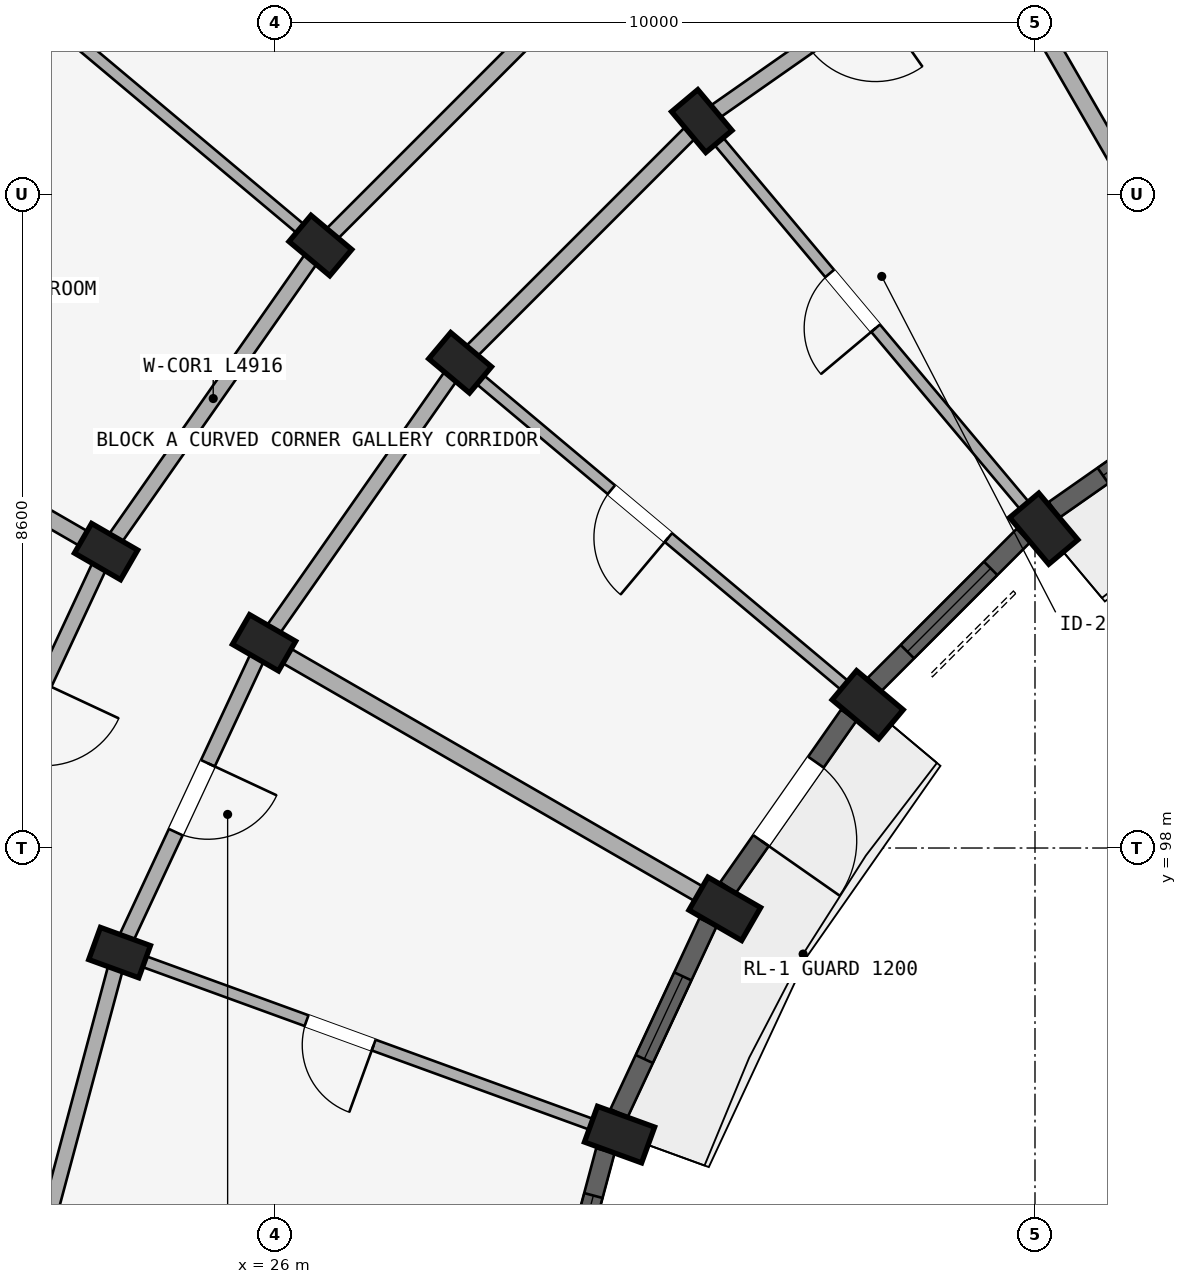
"""IFC4 building model, lengths in metres.
Left out: names, types, materials, properties, quantities, classifications, styles, units other than length and angle.
Written with IfcOpenShell. Run it as: python <this file> out.ifc"""

import sys

from ifc_helpers import new_model, si_unit, direction, frame, frame_2d, origin, origin_2d, place, context, subcontext, project, spatial, rectangle, extrude, element, fill, save


model = new_model("IFC4")
c1 = context("Model", 3, precision=1e-05, world=origin(), true_north=direction((0.0, 1.0)))
c2 = subcontext(c1, "Body", "Model", "MODEL_VIEW")
j1 = project(units=[si_unit("LENGTHUNIT", "METRE"), si_unit("PLANEANGLEUNIT", "RADIAN")], contexts=[c1])
p1 = place(None, origin())
s1 = spatial("IfcSite", under=j1, at=p1, CompositionType="ELEMENT")
p2 = place(p1, origin())
s2 = spatial("IfcBuilding", under=s1, at=p2, CompositionType="ELEMENT")
p3 = place(p2, frame((0.0, 0.0, 18.15)))
s3 = spatial("IfcBuildingStorey", under=s2, at=p3, CompositionType="ELEMENT", Elevation=18.15)
p4 = place(p3, frame((36.115, 102.202, 0.0), z_axis=(0.0, 0.0, 1.0), x_axis=(0.766044443119, 0.642787609687, 0.0)))
e1 = element("IfcColumn", 1, at=p4, inside=s3, PredefinedType="COLUMN", context=c2, shape_type="SweptSolid", body=[
    extrude(rectangle(XDim=0.5, YDim=0.8, at=origin_2d()), origin(), (0.0, 0.0, 1.0), 2.93),
])
p5 = place(p3, frame((31.616, 107.564, 0.0), z_axis=(0.0, 0.0, 1.0), x_axis=(0.766044443119, 0.642787609687, 0.0)))
e2 = element("IfcColumn", 2, at=p5, inside=s3, PredefinedType="COLUMN", context=c2, shape_type="SweptSolid", body=[
    extrude(rectangle(XDim=0.45, YDim=0.7, at=origin_2d()), origin(), (0.0, 0.0, 1.0), 2.93),
])
p6 = place(p3, frame((33.798, 99.885, 0.0), z_axis=(0.0, 0.0, 1.0), x_axis=(0.642787609687, 0.766044443119, 0.0)))
e3 = element("IfcColumn", 3, at=p6, inside=s3, PredefinedType="COLUMN", context=c2, shape_type="SweptSolid", body=[
    extrude(rectangle(XDim=0.5, YDim=0.8, at=origin_2d()), origin(), (0.0, 0.0, 1.0), 2.93),
])
for number, where, z_axis, x_axis in (
    (4, (28.436, 104.384, 0.0), (0.0, 0.0, 1.0), (0.643, 0.766, 0.0)),
    (5, (26.598, 105.927, 0.0), (0.0, 0.0, 1.0), (0.643, 0.766, 0.0)),
):
    element("IfcColumn", number, at=place(p3, frame(where, z_axis=z_axis, x_axis=x_axis)), inside=s3, PredefinedType="COLUMN", context=c2, shape_type="SweptSolid", body=[
        extrude(rectangle(XDim=0.45, YDim=0.7, at=origin_2d()), origin(), (0.0, 0.0, 1.0), 2.93),
    ])
p7 = place(p3, frame((31.919, 97.2, 0.0), z_axis=(0.0, 0.0, 1.0), x_axis=(0.5, 0.866025403784, 0.0)))
e6 = element("IfcColumn", 6, at=p7, inside=s3, PredefinedType="COLUMN", context=c2, shape_type="SweptSolid", body=[
    extrude(rectangle(XDim=0.5, YDim=0.8, at=origin_2d()), origin(), (0.0, 0.0, 1.0), 2.93),
])
for number, where, z_axis, x_axis in (
    (7, (25.856, 100.7, 0.0), (0.0, 0.0, 1.0), (0.5, 0.866, 0.0)),
    (8, (23.778, 101.9, 0.0), (0.0, 0.0, 1.0), (0.5, 0.866, 0.0)),
):
    element("IfcColumn", number, at=place(p3, frame(where, z_axis=z_axis, x_axis=x_axis)), inside=s3, PredefinedType="COLUMN", context=c2, shape_type="SweptSolid", body=[
        extrude(rectangle(XDim=0.45, YDim=0.7, at=origin_2d()), origin(), (0.0, 0.0, 1.0), 2.93),
    ])
p8 = place(p3, frame((30.534, 94.23, 0.0), z_axis=(0.0, 0.0, 1.0), x_axis=(0.342020143326, 0.939692620786, 0.0)))
e9 = element("IfcColumn", 9, at=p8, inside=s3, PredefinedType="COLUMN", context=c2, shape_type="SweptSolid", body=[
    extrude(rectangle(XDim=0.5, YDim=0.8, at=origin_2d()), origin(), (0.0, 0.0, 1.0), 2.93),
])
p9 = place(p3, frame((23.956, 96.624, 0.0), z_axis=(0.0, 0.0, 1.0), x_axis=(0.342020143326, 0.939692620786, 0.0)))
e10 = element("IfcColumn", 10, at=p9, inside=s3, PredefinedType="COLUMN", context=c2, shape_type="SweptSolid", body=[
    extrude(rectangle(XDim=0.45, YDim=0.7, at=origin_2d()), origin(), (0.0, 0.0, 1.0), 2.93),
])
p10 = place(p3, frame((35.3, 110.144, 0.0), z_axis=(0.0, 0.0, 1.0), x_axis=(-0.819155404658, -0.573571637217, 0.0)))
e11 = element("IfcWall", 11, at=p10, inside=s3, PredefinedType="STANDARD", context=c2, shape_type="SweptSolid", body=[
    extrude(rectangle(XDim=4.497, YDim=0.2, at=frame_2d((2.249, 0.0))), origin(), (0.0, 0.0, 1.0), 2.372),
])
p11 = place(p10, frame((1.709, 0.0, 0.0)))
e12 = element("IfcOpeningElement", 12, at=p11, cuts=e11, PredefinedType="OPENING", context=c2, shape_type="SweptSolid", body=[
    extrude(rectangle(XDim=1.08, YDim=2.15, at=frame_2d((0.54, 1.075))), frame((0.0, 0.11, 0.0), z_axis=(0.0, -1.0, 0.0), x_axis=(1.0, 0.0, 0.0)), (0.0, 0.0, 1.0), 0.22),
])
p12 = place(p3, frame((31.616, 107.564, 0.0), z_axis=(0.0, 0.0, 1.0), x_axis=(-0.707106781187, -0.707106781187, 0.0)))
e13 = element("IfcWall", 13, at=p12, inside=s3, PredefinedType="STANDARD", context=c2, shape_type="SweptSolid", body=[
    extrude(rectangle(XDim=4.497, YDim=0.2, at=frame_2d((2.249, 0.0))), origin(), (0.0, 0.0, 1.0), 2.372),
])
p13 = place(p3, frame((30.073, 109.402, 0.0), z_axis=(0.0, 0.0, 1.0), x_axis=(-0.707106781187, -0.707106781187, 0.0)))
e14 = element("IfcWall", 14, at=p13, inside=s3, PredefinedType="STANDARD", context=c2, shape_type="SweptSolid", body=[
    extrude(rectangle(XDim=4.916, YDim=0.2, at=frame_2d((2.458, 0.0))), origin(), (0.0, 0.0, 1.0), 2.372),
])
p14 = place(p3, frame((28.436, 104.384, 0.0), z_axis=(0.0, 0.0, 1.0), x_axis=(-0.573571637217, -0.819155404658, 0.0)))
e15 = element("IfcWall", 15, at=p14, inside=s3, PredefinedType="STANDARD", context=c2, shape_type="SweptSolid", body=[
    extrude(rectangle(XDim=4.497, YDim=0.2, at=frame_2d((2.249, 0.0))), origin(), (0.0, 0.0, 1.0), 2.372),
])
p15 = place(p3, frame((26.598, 105.927, 0.0), z_axis=(0.0, 0.0, 1.0), x_axis=(-0.573592335331, -0.819140911474, 0.0)))
e16 = element("IfcWall", 16, at=p15, inside=s3, PredefinedType="STANDARD", context=c2, shape_type="SweptSolid", body=[
    extrude(rectangle(XDim=4.916, YDim=0.2, at=frame_2d((2.458, 0.0))), origin(), (0.0, 0.0, 1.0), 2.372),
])
p16 = place(p3, frame((25.856, 100.7, 0.0), z_axis=(0.0, 0.0, 1.0), x_axis=(-0.422617978463, -0.906307919131, 0.0)))
e17 = element("IfcWall", 17, at=p16, inside=s3, PredefinedType="STANDARD", context=c2, shape_type="SweptSolid", body=[
    extrude(rectangle(XDim=4.497, YDim=0.2, at=frame_2d((2.249, 0.0))), origin(), (0.0, 0.0, 1.0), 2.372),
])
p17 = place(p16, frame((1.749, 0.0, 0.0)))
e18 = element("IfcOpeningElement", 18, at=p17, cuts=e17, PredefinedType="OPENING", context=c2, shape_type="SweptSolid", body=[
    extrude(rectangle(XDim=1.0, YDim=2.15, at=frame_2d((0.5, 1.075))), frame((0.0, 0.11, 0.0), z_axis=(0.0, -1.0, 0.0), x_axis=(1.0, 0.0, 0.0)), (0.0, 0.0, 1.0), 0.22),
])
p18 = place(p3, frame((23.778, 101.9, 0.0), z_axis=(0.0, 0.0, 1.0), x_axis=(-0.422629854778, -0.906302381024, 0.0)))
e19 = element("IfcWall", 19, at=p18, inside=s3, PredefinedType="STANDARD", context=c2, shape_type="SweptSolid", body=[
    extrude(rectangle(XDim=4.915, YDim=0.2, at=frame_2d((2.458, 0.0))), origin(), (0.0, 0.0, 1.0), 2.372),
])
p19 = place(p18, frame((1.918, 0.0, 0.0)))
e20 = element("IfcOpeningElement", 20, at=p19, cuts=e19, PredefinedType="OPENING", context=c2, shape_type="SweptSolid", body=[
    extrude(rectangle(XDim=1.08, YDim=2.15, at=frame_2d((0.54, 1.075))), frame((0.0, 0.11, 0.0), z_axis=(0.0, -1.0, 0.0), x_axis=(1.0, 0.0, 0.0)), (0.0, 0.0, 1.0), 0.22),
])
p20 = place(p3, frame((23.956, 96.624, 0.0), z_axis=(0.0, 0.0, 1.0), x_axis=(-0.258787642463, -0.965934240054, 0.0)))
e21 = element("IfcWall", 21, at=p20, inside=s3, PredefinedType="STANDARD", context=c2, shape_type="SweptSolid", body=[
    extrude(rectangle(XDim=4.497, YDim=0.2, at=frame_2d((2.249, 0.0))), origin(), (0.0, 0.0, 1.0), 2.372),
])
p21 = place(p3, frame((38.7, 104.254, 0.0), z_axis=(0.0, 0.0, 1.0), x_axis=(-0.499997969693, 0.866026575979, 0.0)))
e22 = element("IfcWall", 22, at=p21, inside=s3, PredefinedType="STANDARD", context=c2, shape_type="SweptSolid", body=[
    extrude(rectangle(XDim=6.75, YDim=0.22, at=frame_2d((3.375, 0.0))), origin(), (0.0, 0.0, 1.0), 2.372),
])
p22 = place(p3, frame((35.987, 102.355, 0.0), z_axis=(0.0, 0.0, 1.0), x_axis=(-0.642784846501, 0.766046761698, 0.0)))
e23 = element("IfcWall", 23, at=p22, inside=s3, PredefinedType="PARTITIONING", context=c2, shape_type="SweptSolid", body=[
    extrude(rectangle(XDim=6.75, YDim=0.15, at=frame_2d((3.375, 0.0))), origin(), (0.0, 0.0, 1.0), 2.372),
])
p23 = place(p22, frame((3.242, 0.0, 0.0)))
e24 = element("IfcOpeningElement", 24, at=p23, cuts=e23, PredefinedType="OPENING", context=c2, shape_type="SweptSolid", body=[
    extrude(rectangle(XDim=0.94, YDim=2.1, at=frame_2d((0.47, 1.05))), frame((0.0, 0.085, 0.0), z_axis=(0.0, -1.0, 0.0), x_axis=(1.0, 0.0, 0.0)), (0.0, 0.0, 1.0), 0.17),
])
p24 = place(p3, frame((33.645, 100.013, 0.0), z_axis=(0.0, 0.0, 1.0), x_axis=(-0.766046761698, 0.642784846501, 0.0)))
e25 = element("IfcWall", 25, at=p24, inside=s3, PredefinedType="PARTITIONING", context=c2, shape_type="SweptSolid", body=[
    extrude(rectangle(XDim=6.75, YDim=0.15, at=frame_2d((3.375, 0.0))), origin(), (0.0, 0.0, 1.0), 2.372),
])
p25 = place(p24, frame((3.222, 0.0, 0.0)))
e26 = element("IfcOpeningElement", 26, at=p25, cuts=e25, PredefinedType="OPENING", context=c2, shape_type="SweptSolid", body=[
    extrude(rectangle(XDim=0.98, YDim=2.12, at=frame_2d((0.49, 1.06))), frame((0.0, 0.085, 0.0), z_axis=(0.0, -1.0, 0.0), x_axis=(1.0, 0.0, 0.0)), (0.0, 0.0, 1.0), 0.17),
])
p26 = place(p3, frame((26.521, 105.991, 0.0), z_axis=(0.0, 0.0, 1.0), x_axis=(-0.766046835987, 0.642784757967, 0.0)))
e27 = element("IfcWall", 27, at=p26, inside=s3, PredefinedType="PARTITIONING", context=c2, shape_type="SweptSolid", body=[
    extrude(rectangle(XDim=17.42, YDim=0.15, at=frame_2d((8.71, 0.0))), origin(), (0.0, 0.0, 1.0), 2.372),
])
p27 = place(p26, frame((4.45, 0.0, 0.0)))
e28 = element("IfcOpeningElement", 28, at=p27, cuts=e27, PredefinedType="OPENING", context=c2, shape_type="SweptSolid", body=[
    extrude(rectangle(XDim=0.8, YDim=2.1, at=frame_2d((0.4, 1.05))), frame((0.0, 0.085, 0.0), z_axis=(0.0, -1.0, 0.0), x_axis=(1.0, 0.0, 0.0)), (0.0, 0.0, 1.0), 0.17),
])
p28 = place(p3, frame((31.746, 97.3, 0.0), z_axis=(0.0, 0.0, 1.0), x_axis=(-0.866026575979, 0.499997969693, 0.0)))
e29 = element("IfcWall", 29, at=p28, inside=s3, PredefinedType="STANDARD", context=c2, shape_type="SweptSolid", body=[
    extrude(rectangle(XDim=6.75, YDim=0.22, at=frame_2d((3.375, 0.0))), origin(), (0.0, 0.0, 1.0), 2.372),
])
p29 = place(p3, frame((23.691, 101.95, 0.0), z_axis=(0.0, 0.0, 1.0), x_axis=(-0.866026648973, 0.499997843263, 0.0)))
e30 = element("IfcWall", 30, at=p29, inside=s3, PredefinedType="STANDARD", context=c2, shape_type="SweptSolid", body=[
    extrude(rectangle(XDim=17.42, YDim=0.22, at=frame_2d((8.71, 0.0))), origin(), (0.0, 0.0, 1.0), 2.372),
])
p30 = place(p3, frame((30.346, 94.298, 0.0), z_axis=(0.0, 0.0, 1.0), x_axis=(-0.939696231917, 0.342010221662, 0.0)))
e31 = element("IfcWall", 31, at=p30, inside=s3, PredefinedType="PARTITIONING", context=c2, shape_type="SweptSolid", body=[
    extrude(rectangle(XDim=6.75, YDim=0.15, at=frame_2d((3.375, 0.0))), origin(), (0.0, 0.0, 1.0), 2.372),
])
p31 = place(p30, frame((3.242, 0.0, 0.0)))
e32 = element("IfcOpeningElement", 32, at=p31, cuts=e31, PredefinedType="OPENING", context=c2, shape_type="SweptSolid", body=[
    extrude(rectangle(XDim=0.94, YDim=2.1, at=frame_2d((0.47, 1.05))), frame((0.0, 0.085, 0.0), z_axis=(0.0, -1.0, 0.0), x_axis=(1.0, 0.0, 0.0)), (0.0, 0.0, 1.0), 0.17),
])
p32 = place(p3, frame((38.521, 104.038, 0.0), z_axis=(0.0, 0.0, 1.0), x_axis=(-0.819111815273, -0.573633885053, 0.0)))
e33 = element("IfcWall", 33, at=p32, inside=s3, PredefinedType="STANDARD", context=c2, shape_type="SweptSolid", body=[
    extrude(rectangle(XDim=2.77, YDim=0.25, at=frame_2d((1.385, 0.0))), origin(), (0.0, 0.0, 1.0), 2.422),
])
p33 = place(p32, frame((0.785, 0.0, 0.722)))
e34 = element("IfcOpeningElement", 34, at=p33, cuts=e33, PredefinedType="OPENING", context=c2, shape_type="SweptSolid", body=[
    extrude(rectangle(XDim=1.2, YDim=1.5, at=frame_2d((0.6, 0.75))), frame((0.0, 0.135, 0.0), z_axis=(0.0, -1.0, 0.0), x_axis=(1.0, 0.0, 0.0)), (0.0, 0.0, 1.0), 0.27),
])
p34 = place(p3, frame((35.848, 102.111, 0.0), z_axis=(0.0, 0.0, 1.0), x_axis=(-0.707106781187, -0.707106781187, 0.0)))
e35 = element("IfcWall", 35, at=p34, inside=s3, PredefinedType="STANDARD", context=c2, shape_type="SweptSolid", body=[
    extrude(rectangle(XDim=2.77, YDim=0.25, at=frame_2d((1.385, 0.0))), origin(), (0.0, 0.0, 1.0), 2.422),
])
p35 = place(p34, frame((0.61, 0.0, 0.622)))
e36 = element("IfcOpeningElement", 36, at=p35, cuts=e35, PredefinedType="OPENING", context=c2, shape_type="SweptSolid", body=[
    extrude(rectangle(XDim=1.55, YDim=1.6, at=frame_2d((0.775, 0.8))), frame((0.0, 0.135, 0.0), z_axis=(0.0, -1.0, 0.0), x_axis=(1.0, 0.0, 0.0)), (0.0, 0.0, 1.0), 0.27),
])
p36 = place(p3, frame((33.551, 99.748, 0.0), z_axis=(0.0, 0.0, 1.0), x_axis=(-0.573633885053, -0.819111815273, 0.0)))
e37 = element("IfcWall", 37, at=p36, inside=s3, PredefinedType="STANDARD", context=c2, shape_type="SweptSolid", body=[
    extrude(rectangle(XDim=2.77, YDim=0.25, at=frame_2d((1.385, 0.0))), origin(), (0.0, 0.0, 1.0), 2.422),
])
p37 = place(p36, frame((0.755, 0.0, 0.0)))
e38 = element("IfcOpeningElement", 38, at=p37, cuts=e37, PredefinedType="OPENING", context=c2, shape_type="SweptSolid", body=[
    extrude(rectangle(XDim=1.26, YDim=2.15, at=frame_2d((0.63, 1.075))), frame((0.0, 0.135, 0.0), z_axis=(0.0, -1.0, 0.0), x_axis=(1.0, 0.0, 0.0)), (0.0, 0.0, 1.0), 0.27),
])
p38 = place(p3, frame((31.698, 97.023, 0.0), z_axis=(0.0, 0.0, 1.0), x_axis=(-0.422649007088, -0.906293449611, 0.0)))
e39 = element("IfcWall", 39, at=p38, inside=s3, PredefinedType="STANDARD", context=c2, shape_type="SweptSolid", body=[
    extrude(rectangle(XDim=2.77, YDim=0.25, at=frame_2d((1.385, 0.0))), origin(), (0.0, 0.0, 1.0), 2.422),
])
p39 = place(p38, frame((0.785, 0.0, 0.722)))
e40 = element("IfcOpeningElement", 40, at=p39, cuts=e39, PredefinedType="OPENING", context=c2, shape_type="SweptSolid", body=[
    extrude(rectangle(XDim=1.2, YDim=1.5, at=frame_2d((0.6, 0.75))), frame((0.0, 0.135, 0.0), z_axis=(0.0, -1.0, 0.0), x_axis=(1.0, 0.0, 0.0)), (0.0, 0.0, 1.0), 0.27),
])
p40 = place(p3, frame((30.347, 94.017, 0.0), z_axis=(0.0, 0.0, 1.0), x_axis=(-0.25878161084, -0.965935855992, 0.0)))
e41 = element("IfcWall", 41, at=p40, inside=s3, PredefinedType="STANDARD", context=c2, shape_type="SweptSolid", body=[
    extrude(rectangle(XDim=2.77, YDim=0.25, at=frame_2d((1.385, 0.0))), origin(), (0.0, 0.0, 1.0), 2.422),
])
p41 = place(p40, frame((0.61, 0.0, 0.622)))
e42 = element("IfcOpeningElement", 42, at=p41, cuts=e41, PredefinedType="OPENING", context=c2, shape_type="SweptSolid", body=[
    extrude(rectangle(XDim=1.55, YDim=1.6, at=frame_2d((0.775, 0.8))), frame((0.0, 0.135, 0.0), z_axis=(0.0, -1.0, 0.0), x_axis=(1.0, 0.0, 0.0)), (0.0, 0.0, 1.0), 0.27),
])
p42 = place(p33, origin())
e43 = element("IfcWindow", 43, at=p42, inside=s3, PartitioningType="SINGLE_PANEL", PredefinedType="WINDOW", context=c2, shape_type="SweptSolid", body=[
    extrude(rectangle(XDim=1.2, YDim=1.5, at=frame_2d((0.6, 0.75))), frame((0.0, 0.03, 0.0), z_axis=(0.0, -1.0, 0.0), x_axis=(1.0, 0.0, 0.0)), (0.0, 0.0, 1.0), 0.06),
])
fill(e34, e43)
p43 = place(p35, origin())
e44 = element("IfcWindow", 44, at=p43, inside=s3, PartitioningType="DOUBLE_PANEL_VERTICAL", PredefinedType="WINDOW", context=c2, shape_type="SweptSolid", body=[
    extrude(rectangle(XDim=1.55, YDim=1.6, at=frame_2d((0.775, 0.8))), frame((0.0, 0.03, 0.0), z_axis=(0.0, -1.0, 0.0), x_axis=(1.0, 0.0, 0.0)), (0.0, 0.0, 1.0), 0.06),
])
fill(e36, e44)
p44 = place(p39, origin())
e45 = element("IfcWindow", 45, at=p44, inside=s3, PartitioningType="SINGLE_PANEL", PredefinedType="WINDOW", context=c2, shape_type="SweptSolid", body=[
    extrude(rectangle(XDim=1.2, YDim=1.5, at=frame_2d((0.6, 0.75))), frame((0.0, 0.03, 0.0), z_axis=(0.0, -1.0, 0.0), x_axis=(1.0, 0.0, 0.0)), (0.0, 0.0, 1.0), 0.06),
])
fill(e40, e45)
p45 = place(p41, origin())
e46 = element("IfcWindow", 46, at=p45, inside=s3, PartitioningType="DOUBLE_PANEL_VERTICAL", PredefinedType="WINDOW", context=c2, shape_type="SweptSolid", body=[
    extrude(rectangle(XDim=1.55, YDim=1.6, at=frame_2d((0.775, 0.8))), frame((0.0, 0.03, 0.0), z_axis=(0.0, -1.0, 0.0), x_axis=(1.0, 0.0, 0.0)), (0.0, 0.0, 1.0), 0.06),
])
fill(e42, e46)
p46 = place(p23, origin())
e47 = element("IfcDoor", 47, at=p46, inside=s3, OperationType="SINGLE_SWING_LEFT", PredefinedType="DOOR", context=c2, shape_type="SweptSolid", body=[
    extrude(rectangle(XDim=0.94, YDim=2.1, at=frame_2d((0.47, 1.05))), frame((0.0, 0.025, 0.0), z_axis=(0.0, -1.0, 0.0), x_axis=(1.0, 0.0, 0.0)), (0.0, 0.0, 1.0), 0.05),
])
fill(e24, e47)
p47 = place(p25, origin())
e48 = element("IfcDoor", 48, at=p47, inside=s3, OperationType="SINGLE_SWING_LEFT", PredefinedType="DOOR", context=c2, shape_type="SweptSolid", body=[
    extrude(rectangle(XDim=0.98, YDim=2.12, at=frame_2d((0.49, 1.06))), frame((0.0, 0.025, 0.0), z_axis=(0.0, -1.0, 0.0), x_axis=(1.0, 0.0, 0.0)), (0.0, 0.0, 1.0), 0.05),
])
fill(e26, e48)
p48 = place(p31, origin())
e49 = element("IfcDoor", 49, at=p48, inside=s3, OperationType="SINGLE_SWING_LEFT", PredefinedType="DOOR", context=c2, shape_type="SweptSolid", body=[
    extrude(rectangle(XDim=0.94, YDim=2.1, at=frame_2d((0.47, 1.05))), frame((0.0, 0.025, 0.0), z_axis=(0.0, -1.0, 0.0), x_axis=(1.0, 0.0, 0.0)), (0.0, 0.0, 1.0), 0.05),
])
fill(e32, e49)
p49 = place(p17, frame((1.0, 0.0, 0.0), z_axis=(0.0, 0.0, 1.0), x_axis=(-1.0, 0.0, 0.0)))
e50 = element("IfcDoor", 50, at=p49, inside=s3, OperationType="SINGLE_SWING_RIGHT", PredefinedType="DOOR", context=c2, shape_type="SweptSolid", body=[
    extrude(rectangle(XDim=1.0, YDim=2.15, at=frame_2d((0.5, 1.075))), frame((0.0, 0.025, 0.0), z_axis=(0.0, -1.0, 0.0), x_axis=(1.0, 0.0, 0.0)), (0.0, 0.0, 1.0), 0.05),
])
fill(e18, e50)
p50 = place(p37, origin())
e51 = element("IfcDoor", 51, at=p50, inside=s3, OperationType="SINGLE_SWING_RIGHT", PredefinedType="DOOR", context=c2, shape_type="SweptSolid", body=[
    extrude(rectangle(XDim=1.26, YDim=2.15, at=frame_2d((0.63, 1.075))), frame((0.0, 0.025, 0.0), z_axis=(0.0, -1.0, 0.0), x_axis=(1.0, 0.0, 0.0)), (0.0, 0.0, 1.0), 0.05),
])
fill(e38, e51)
save(model, sys.argv[1])
